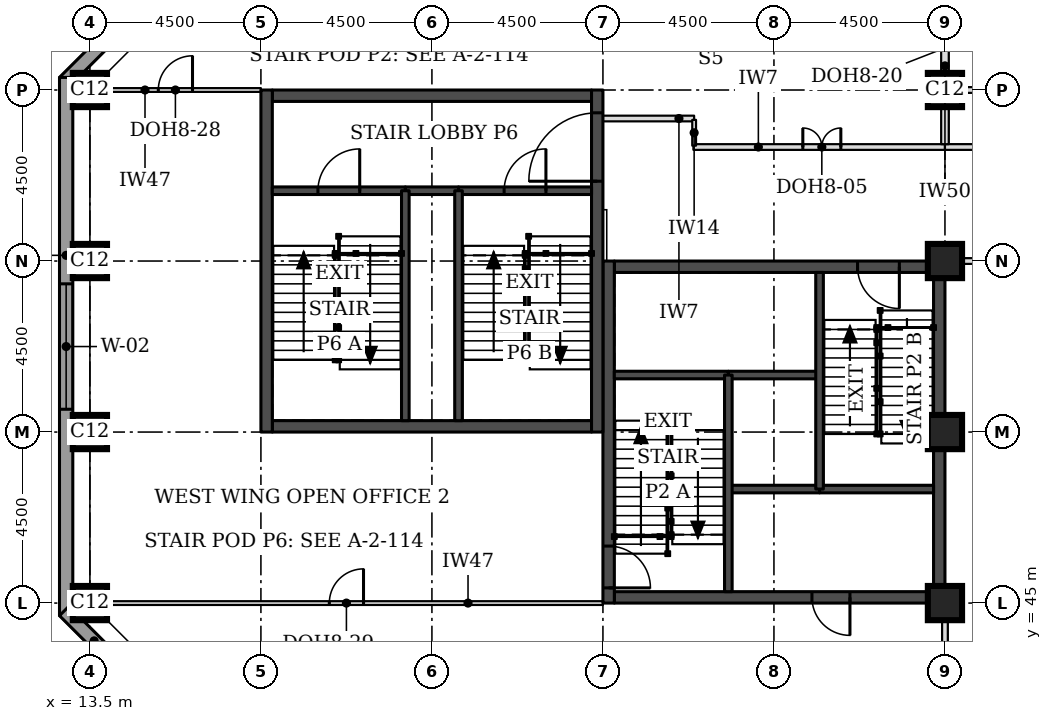
"""IFC4 building model, lengths in metres.
Left out: names, types, materials, properties, quantities, classifications, styles, units other than length and angle.
Written with IfcOpenShell. Run it as: python <this file> out.ifc"""

import sys

from ifc_helpers import new_model, si_unit, direction, frame, frame_2d, origin, origin_2d, place, context, subcontext, project, spatial, rectangle, extrude, element, fill, save


model = new_model("IFC4")
c1 = context("Model", 3, precision=1e-05, world=origin(), true_north=direction((0.0, 1.0)))
c2 = subcontext(c1, "Body", "Model", "MODEL_VIEW")
j1 = project(units=[si_unit("LENGTHUNIT", "METRE"), si_unit("PLANEANGLEUNIT", "RADIAN")], contexts=[c1])
p1 = place(None, origin())
s1 = spatial("IfcSite", under=j1, at=p1, CompositionType="ELEMENT")
p2 = place(p1, origin())
s2 = spatial("IfcBuilding", under=s1, at=p2, CompositionType="ELEMENT")
p3 = place(p2, frame((0.0, 0.0, 199.5)))
s3 = spatial("IfcBuildingStorey", under=s2, at=p3, CompositionType="ELEMENT", Elevation=199.5)
for number, where, z_axis, x_axis in (
    (1, (13.5, 45.0, 0.0), (0.0, 0.0, 1.0), (1.0, 0.0, 0.0)),
    (2, (36.0, 45.0, 0.0), (0.0, 0.0, 1.0), (1.0, 0.0, 0.0)),
    (3, (13.5, 49.5, 0.0), (0.0, 0.0, 1.0), (1.0, 0.0, 0.0)),
    (4, (36.0, 49.5, 0.0), (0.0, 0.0, 1.0), (1.0, 0.0, 0.0)),
    (5, (13.5, 54.0, 0.0), (0.0, 0.0, 1.0), (1.0, 0.0, 0.0)),
    (6, (36.0, 54.0, 0.0), (0.0, 0.0, 1.0), (1.0, 0.0, 0.0)),
    (7, (13.5, 58.5, 0.0), (0.0, 0.0, 1.0), (1.0, 0.0, 0.0)),
    (8, (36.0, 58.5, 0.0), (0.0, 0.0, 1.0), (1.0, 0.0, 0.0)),
):
    element("IfcColumn", number, at=place(p3, frame(where, z_axis=z_axis, x_axis=x_axis)), inside=s3, PredefinedType="COLUMN", context=c2, shape_type="SweptSolid", body=[
        extrude(rectangle(XDim=0.9, YDim=0.9, at=origin_2d()), origin(), (0.0, 0.0, 1.0), 3.7),
    ])
p4 = place(p3, frame((27.3, 45.15, 0.0), z_axis=(0.0, 0.0, 1.0), x_axis=(1.0, 0.0, 0.0)))
e9 = element("IfcWall", 9, at=p4, inside=s3, PredefinedType="SHEAR", context=c2, shape_type="SweptSolid", body=[
    extrude(rectangle(XDim=8.4, YDim=0.3, at=frame_2d((4.2, 0.0))), origin(), (0.0, 0.0, 1.0), 3.7),
])
p5 = place(p4, frame((5.2, 0.0, 0.0)))
e10 = element("IfcOpeningElement", 10, at=p5, cuts=e9, PredefinedType="OPENING", context=c2, shape_type="SweptSolid", body=[
    extrude(rectangle(XDim=1.0, YDim=2.1, at=frame_2d((0.5, 1.05))), frame((0.0, 0.16, 0.0), z_axis=(0.0, -1.0, 0.0), x_axis=(1.0, 0.0, 0.0)), (0.0, 0.0, 1.0), 0.32),
])
p6 = place(p3, frame((27.3, 53.85, 0.0), z_axis=(0.0, 0.0, 1.0), x_axis=(1.0, 0.0, 0.0)))
e11 = element("IfcWall", 11, at=p6, inside=s3, PredefinedType="SHEAR", context=c2, shape_type="SweptSolid", body=[
    extrude(rectangle(XDim=8.4, YDim=0.3, at=frame_2d((4.2, 0.0))), origin(), (0.0, 0.0, 1.0), 3.7),
])
p7 = place(p6, frame((6.4, 0.0, 0.0)))
e12 = element("IfcOpeningElement", 12, at=p7, cuts=e11, PredefinedType="OPENING", context=c2, shape_type="SweptSolid", body=[
    extrude(rectangle(XDim=1.1, YDim=2.1, at=frame_2d((0.55, 1.05))), frame((0.0, 0.16, 0.0), z_axis=(0.0, -1.0, 0.0), x_axis=(1.0, 0.0, 0.0)), (0.0, 0.0, 1.0), 0.32),
])
p8 = place(p3, frame((27.15, 45.0, 0.0), z_axis=(0.0, 0.0, 1.0), x_axis=(0.0, 1.0, 0.0)))
e13 = element("IfcWall", 13, at=p8, inside=s3, PredefinedType="SHEAR", context=c2, shape_type="SweptSolid", body=[
    extrude(rectangle(XDim=9.0, YDim=0.3, at=frame_2d((4.5, 0.0))), origin(), (0.0, 0.0, 1.0), 3.7),
])
p9 = place(p8, frame((0.4, 0.0, 0.0)))
e14 = element("IfcOpeningElement", 14, at=p9, cuts=e13, PredefinedType="OPENING", context=c2, shape_type="SweptSolid", body=[
    extrude(rectangle(XDim=1.1, YDim=2.1, at=frame_2d((0.55, 1.05))), frame((0.0, 0.16, 0.0), z_axis=(0.0, -1.0, 0.0), x_axis=(1.0, 0.0, 0.0)), (0.0, 0.0, 1.0), 0.32),
])
p10 = place(p3, frame((35.85, 45.0, 0.0), z_axis=(0.0, 0.0, 1.0), x_axis=(0.0, 1.0, 0.0)))
e15 = element("IfcWall", 15, at=p10, inside=s3, PredefinedType="SHEAR", context=c2, shape_type="SweptSolid", body=[
    extrude(rectangle(XDim=9.0, YDim=0.3, at=frame_2d((4.5, 0.0))), origin(), (0.0, 0.0, 1.0), 3.7),
])
for number, where, z_axis, x_axis in (
    (16, (18.3, 49.65, 0.0), (0.0, 0.0, 1.0), (1.0, 0.0, 0.0)),
    (17, (18.3, 58.35, 0.0), (0.0, 0.0, 1.0), (1.0, 0.0, 0.0)),
):
    element("IfcWall", number, at=place(p3, frame(where, z_axis=z_axis, x_axis=x_axis)), inside=s3, PredefinedType="SHEAR", context=c2, shape_type="SweptSolid", body=[
        extrude(rectangle(XDim=8.4, YDim=0.3, at=frame_2d((4.2, 0.0))), origin(), (0.0, 0.0, 1.0), 3.7),
    ])
p11 = place(p3, frame((18.15, 49.5, 0.0), z_axis=(0.0, 0.0, 1.0), x_axis=(0.0, 1.0, 0.0)))
e18 = element("IfcWall", 18, at=p11, inside=s3, PredefinedType="SHEAR", context=c2, shape_type="SweptSolid", body=[
    extrude(rectangle(XDim=9.0, YDim=0.3, at=frame_2d((4.5, 0.0))), origin(), (0.0, 0.0, 1.0), 3.7),
])
p12 = place(p3, frame((26.85, 49.5, 0.0), z_axis=(0.0, 0.0, 1.0), x_axis=(0.0, 1.0, 0.0)))
e19 = element("IfcWall", 19, at=p12, inside=s3, PredefinedType="SHEAR", context=c2, shape_type="SweptSolid", body=[
    extrude(rectangle(XDim=9.0, YDim=0.3, at=frame_2d((4.5, 0.0))), origin(), (0.0, 0.0, 1.0), 3.7),
])
p13 = place(p12, frame((6.6, 0.0, 0.0)))
e20 = element("IfcOpeningElement", 20, at=p13, cuts=e19, PredefinedType="OPENING", context=c2, shape_type="SweptSolid", body=[
    extrude(rectangle(XDim=1.8, YDim=2.1, at=frame_2d((0.9, 1.05))), frame((0.0, 0.16, 0.0), z_axis=(0.0, -1.0, 0.0), x_axis=(1.0, 0.0, 0.0)), (0.0, 0.0, 1.0), 0.32),
])
p14 = place(p3, frame((17.792, 63.676, 0.0), z_axis=(0.0, 0.0, 1.0), x_axis=(-0.707106781187, -0.707106781187, 0.0)))
e21 = element("IfcWall", 21, at=p14, inside=s3, PredefinedType="STANDARD", context=c2, shape_type="SweptSolid", body=[
    extrude(rectangle(XDim=7.027, YDim=0.35, at=frame_2d((3.513, 0.0))), origin(), (0.0, 0.0, 1.0), 3.525),
])
p15 = place(p14, frame((1.863, 0.0, 0.9)))
e22 = element("IfcOpeningElement", 22, at=p15, cuts=e21, PredefinedType="OPENING", context=c2, shape_type="SweptSolid", body=[
    extrude(rectangle(XDim=3.3, YDim=1.9, at=frame_2d((1.65, 0.95))), frame((0.0, 0.185, 0.0), z_axis=(0.0, -1.0, 0.0), x_axis=(1.0, 0.0, 0.0)), (0.0, 0.0, 1.0), 0.37),
])
p16 = place(p3, frame((12.875, 58.831, 0.0), z_axis=(0.0, 0.0, 1.0), x_axis=(0.0, -1.0, 0.0)))
e23 = element("IfcWall", 23, at=p16, inside=s3, PredefinedType="STANDARD", context=c2, shape_type="SweptSolid", body=[
    extrude(rectangle(XDim=14.163, YDim=0.35, at=frame_2d((7.081, 0.0))), origin(), (0.0, 0.0, 1.0), 3.525),
])
p17 = place(p16, frame((5.431, 0.0, 0.9)))
e24 = element("IfcOpeningElement", 24, at=p17, cuts=e23, PredefinedType="OPENING", context=c2, shape_type="SweptSolid", body=[
    extrude(rectangle(XDim=3.3, YDim=1.9, at=frame_2d((1.65, 0.95))), frame((0.0, 0.185, 0.0), z_axis=(0.0, -1.0, 0.0), x_axis=(1.0, 0.0, 0.0)), (0.0, 0.0, 1.0), 0.37),
])
p18 = place(p3, frame((12.824, 44.792, 0.0), z_axis=(0.0, 0.0, 1.0), x_axis=(0.707106781187, -0.707106781187, 0.0)))
e25 = element("IfcWall", 25, at=p18, inside=s3, PredefinedType="STANDARD", context=c2, shape_type="SweptSolid", body=[
    extrude(rectangle(XDim=7.027, YDim=0.35, at=frame_2d((3.513, 0.0))), origin(), (0.0, 0.0, 1.0), 3.525),
])
p19 = place(p18, frame((1.863, 0.0, 0.9)))
e26 = element("IfcOpeningElement", 26, at=p19, cuts=e25, PredefinedType="OPENING", context=c2, shape_type="SweptSolid", body=[
    extrude(rectangle(XDim=3.3, YDim=1.9, at=frame_2d((1.65, 0.95))), frame((0.0, 0.185, 0.0), z_axis=(0.0, -1.0, 0.0), x_axis=(1.0, 0.0, 0.0)), (0.0, 0.0, 1.0), 0.37),
])
p20 = place(p3, frame((36.45, 54.0, 0.0), z_axis=(0.0, 0.0, 1.0), x_axis=(1.0, 0.0, 0.0)))
e27 = element("IfcWall", 27, at=p20, inside=s3, PredefinedType="PARTITIONING", context=c2, shape_type="SweptSolid", body=[
    extrude(rectangle(XDim=5.625, YDim=0.15, at=frame_2d((2.812, 0.0))), origin(), (0.0, 0.0, 1.0), 3.55),
])
p21 = place(p3, frame((29.38, 57.0, 0.0), z_axis=(0.0, 0.0, 1.0), x_axis=(1.0, 0.0, 0.0)))
e28 = element("IfcWall", 28, at=p21, inside=s3, PredefinedType="PARTITIONING", context=c2, shape_type="SweptSolid", body=[
    extrude(rectangle(XDim=6.62, YDim=0.15, at=frame_2d((3.31, 0.0))), origin(), (0.0, 0.0, 1.0), 3.55),
])
p22 = place(p21, frame((2.88, 0.0, 0.0)))
e29 = element("IfcOpeningElement", 29, at=p22, cuts=e28, PredefinedType="OPENING", context=c2, shape_type="SweptSolid", body=[
    extrude(rectangle(XDim=1.0, YDim=2.1, at=frame_2d((0.5, 1.05))), frame((0.0, 0.085, 0.0), z_axis=(0.0, -1.0, 0.0), x_axis=(1.0, 0.0, 0.0)), (0.0, 0.0, 1.0), 0.17),
])
p23 = place(p3, frame((36.0, 57.0, 0.0), z_axis=(0.0, 0.0, 1.0), x_axis=(1.0, 0.0, 0.0)))
e30 = element("IfcWall", 30, at=p23, inside=s3, PredefinedType="PARTITIONING", context=c2, shape_type="SweptSolid", body=[
    extrude(rectangle(XDim=6.075, YDim=0.15, at=frame_2d((3.038, 0.0))), origin(), (0.0, 0.0, 1.0), 3.55),
])
p24 = place(p23, frame((2.55, 0.0, 0.0)))
e31 = element("IfcOpeningElement", 31, at=p24, cuts=e30, PredefinedType="OPENING", context=c2, shape_type="SweptSolid", body=[
    extrude(rectangle(XDim=1.0, YDim=2.1, at=frame_2d((0.5, 1.05))), frame((0.0, 0.085, 0.0), z_axis=(0.0, -1.0, 0.0), x_axis=(1.0, 0.0, 0.0)), (0.0, 0.0, 1.0), 0.17),
])
p25 = place(p3, frame((36.45, 58.5, 0.0), z_axis=(0.0, 0.0, 1.0), x_axis=(1.0, 0.0, 0.0)))
e32 = element("IfcWall", 32, at=p25, inside=s3, PredefinedType="PARTITIONING", context=c2, shape_type="SweptSolid", body=[
    extrude(rectangle(XDim=2.625, YDim=0.15, at=frame_2d((1.312, 0.0))), origin(), (0.0, 0.0, 1.0), 3.55),
])
p26 = place(p3, frame((36.0, 40.95, 0.0), z_axis=(0.0, 0.0, 1.0), x_axis=(0.0, 1.0, 0.0)))
e33 = element("IfcWall", 33, at=p26, inside=s3, PredefinedType="PARTITIONING", context=c2, shape_type="SweptSolid", body=[
    extrude(rectangle(XDim=3.63, YDim=0.15, at=frame_2d((1.815, 0.0))), origin(), (0.0, 0.0, 1.0), 2.8),
])
p27 = place(p26, frame((1.4, 0.0, 0.0)))
e34 = element("IfcOpeningElement", 34, at=p27, cuts=e33, PredefinedType="OPENING", context=c2, shape_type="SweptSolid", body=[
    extrude(rectangle(XDim=0.9, YDim=2.1, at=frame_2d((0.45, 1.05))), frame((0.0, 0.085, 0.0), z_axis=(0.0, -1.0, 0.0), x_axis=(1.0, 0.0, 0.0)), (0.0, 0.0, 1.0), 0.17),
])
p28 = place(p3, frame((36.0, 57.075, 0.0), z_axis=(0.0, 0.0, 1.0), x_axis=(0.0, 1.0, 0.0)))
e35 = element("IfcWall", 35, at=p28, inside=s3, PredefinedType="PARTITIONING", context=c2, shape_type="SweptSolid", body=[
    extrude(rectangle(XDim=0.975, YDim=0.2, at=frame_2d((0.488, 0.0))), origin(), (0.0, 0.0, 1.0), 2.8),
])
p29 = place(p3, frame((36.0, 58.92, 0.0), z_axis=(0.0, 0.0, 1.0), x_axis=(0.0, 1.0, 0.0)))
e36 = element("IfcWall", 36, at=p29, inside=s3, PredefinedType="PARTITIONING", context=c2, shape_type="SweptSolid", body=[
    extrude(rectangle(XDim=3.63, YDim=0.2, at=frame_2d((1.815, 0.0))), origin(), (0.0, 0.0, 1.0), 2.8),
])
p30 = place(p3, frame((13.5, 58.5, 0.0), z_axis=(0.0, 0.0, 1.0), x_axis=(1.0, 0.0, 0.0)))
e37 = element("IfcWall", 37, at=p30, inside=s3, PredefinedType="PARTITIONING", context=c2, shape_type="SweptSolid", body=[
    extrude(rectangle(XDim=4.5, YDim=0.1, at=frame_2d((2.25, 0.0))), origin(), (0.0, 0.0, 1.0), 2.55),
])
p31 = place(p30, frame((1.8, 0.0, 0.0)))
e38 = element("IfcOpeningElement", 38, at=p31, cuts=e37, PredefinedType="OPENING", context=c2, shape_type="SweptSolid", body=[
    extrude(rectangle(XDim=0.9, YDim=2.1, at=frame_2d((0.45, 1.05))), frame((0.0, 0.06, 0.0), z_axis=(0.0, -1.0, 0.0), x_axis=(1.0, 0.0, 0.0)), (0.0, 0.0, 1.0), 0.12),
])
p32 = place(p3, frame((27.0, 45.0, 0.0), z_axis=(0.0, 0.0, 1.0), x_axis=(-1.0, 0.0, 0.0)))
e39 = element("IfcWall", 39, at=p32, inside=s3, PredefinedType="PARTITIONING", context=c2, shape_type="SweptSolid", body=[
    extrude(rectangle(XDim=13.5, YDim=0.1, at=frame_2d((6.75, 0.0))), origin(), (0.0, 0.0, 1.0), 2.55),
])
p33 = place(p32, frame((6.3, 0.0, 0.0)))
e40 = element("IfcOpeningElement", 40, at=p33, cuts=e39, PredefinedType="OPENING", context=c2, shape_type="SweptSolid", body=[
    extrude(rectangle(XDim=0.9, YDim=2.1, at=frame_2d((0.45, 1.05))), frame((0.0, 0.06, 0.0), z_axis=(0.0, -1.0, 0.0), x_axis=(1.0, 0.0, 0.0)), (0.0, 0.0, 1.0), 0.12),
])
p34 = place(p3, frame((27.0, 57.75, 0.0), z_axis=(0.0, 0.0, 1.0), x_axis=(1.0, 0.0, 0.0)))
e41 = element("IfcWall", 41, at=p34, inside=s3, PredefinedType="PARTITIONING", context=c2, shape_type="SweptSolid", body=[
    extrude(rectangle(XDim=2.4, YDim=0.15, at=frame_2d((1.2, 0.0))), origin(), (0.0, 0.0, 1.0), 3.55),
])
p35 = place(p3, frame((29.4, 57.715, 0.0), z_axis=(0.0, 0.0, 1.0), x_axis=(0.0, -1.0, 0.0)))
e42 = element("IfcWall", 42, at=p35, inside=s3, PredefinedType="PARTITIONING", context=c2, shape_type="SweptSolid", body=[
    extrude(rectangle(XDim=0.68, YDim=0.1, at=frame_2d((0.34, 0.0))), origin(), (0.0, 0.0, 1.0), 3.55),
])
p36 = place(p3, frame((30.3, 48.0, 0.0), z_axis=(0.0, 0.0, 1.0), x_axis=(1.0, 0.0, 0.0)))
e43 = element("IfcWall", 43, at=p36, inside=s3, PredefinedType="SOLIDWALL", context=c2, shape_type="SweptSolid", body=[
    extrude(rectangle(XDim=2.4, YDim=0.2, at=frame_2d((1.2, 0.0))), origin(), (0.0, 0.0, 1.0), 3.55),
])
p37 = place(p3, frame((32.7, 48.0, 0.0), z_axis=(0.0, 0.0, 1.0), x_axis=(1.0, 0.0, 0.0)))
e44 = element("IfcWall", 44, at=p37, inside=s3, PredefinedType="SOLIDWALL", context=c2, shape_type="SweptSolid", body=[
    extrude(rectangle(XDim=3.0, YDim=0.2, at=frame_2d((1.5, 0.0))), origin(), (0.0, 0.0, 1.0), 3.55),
])
p38 = place(p3, frame((30.3, 51.0, 0.0), z_axis=(0.0, 0.0, 1.0), x_axis=(1.0, 0.0, 0.0)))
e45 = element("IfcWall", 45, at=p38, inside=s3, PredefinedType="SOLIDWALL", context=c2, shape_type="SweptSolid", body=[
    extrude(rectangle(XDim=2.4, YDim=0.2, at=frame_2d((1.2, 0.0))), origin(), (0.0, 0.0, 1.0), 3.7),
])
p39 = place(p3, frame((27.3, 51.0, 0.0), z_axis=(0.0, 0.0, 1.0), x_axis=(1.0, 0.0, 0.0)))
e46 = element("IfcWall", 46, at=p39, inside=s3, PredefinedType="SOLIDWALL", context=c2, shape_type="SweptSolid", body=[
    extrude(rectangle(XDim=3.0, YDim=0.2, at=frame_2d((1.5, 0.0))), origin(), (0.0, 0.0, 1.0), 3.55),
])
for number, where, z_axis, x_axis in (
    (47, (30.3, 45.3, 0.0), (0.0, 0.0, 1.0), (0.0, 1.0, 0.0)),
    (48, (32.7, 48.0, 0.0), (0.0, 0.0, 1.0), (0.0, 1.0, 0.0)),
):
    element("IfcWall", number, at=place(p3, frame(where, z_axis=z_axis, x_axis=x_axis)), inside=s3, PredefinedType="SOLIDWALL", context=c2, shape_type="SweptSolid", body=[
        extrude(rectangle(XDim=5.7, YDim=0.2, at=frame_2d((2.85, 0.0))), origin(), (0.0, 0.0, 1.0), 3.55),
    ])
p40 = place(p3, frame((21.8, 55.85, 0.0), z_axis=(0.0, 0.0, 1.0), x_axis=(1.0, 0.0, 0.0)))
e49 = element("IfcWall", 49, at=p40, inside=s3, PredefinedType="SOLIDWALL", context=c2, shape_type="SweptSolid", body=[
    extrude(rectangle(XDim=1.4, YDim=0.2, at=frame_2d((0.7, 0.0))), origin(), (0.0, 0.0, 1.0), 3.55),
])
p41 = place(p3, frame((18.3, 55.85, 0.0), z_axis=(0.0, 0.0, 1.0), x_axis=(1.0, 0.0, 0.0)))
e50 = element("IfcWall", 50, at=p41, inside=s3, PredefinedType="SOLIDWALL", context=c2, shape_type="SweptSolid", body=[
    extrude(rectangle(XDim=3.5, YDim=0.2, at=frame_2d((1.75, 0.0))), origin(), (0.0, 0.0, 1.0), 3.55),
])
p42 = place(p41, frame((1.2, 0.0, 0.0)))
e51 = element("IfcOpeningElement", 51, at=p42, cuts=e50, PredefinedType="OPENING", context=c2, shape_type="SweptSolid", body=[
    extrude(rectangle(XDim=1.1, YDim=2.1, at=frame_2d((0.55, 1.05))), frame((0.0, 0.11, 0.0), z_axis=(0.0, -1.0, 0.0), x_axis=(1.0, 0.0, 0.0)), (0.0, 0.0, 1.0), 0.22),
])
p43 = place(p3, frame((23.2, 55.85, 0.0), z_axis=(0.0, 0.0, 1.0), x_axis=(1.0, 0.0, 0.0)))
e52 = element("IfcWall", 52, at=p43, inside=s3, PredefinedType="SOLIDWALL", context=c2, shape_type="SweptSolid", body=[
    extrude(rectangle(XDim=3.5, YDim=0.2, at=frame_2d((1.75, 0.0))), origin(), (0.0, 0.0, 1.0), 3.55),
])
p44 = place(p43, frame((1.2, 0.0, 0.0)))
e53 = element("IfcOpeningElement", 53, at=p44, cuts=e52, PredefinedType="OPENING", context=c2, shape_type="SweptSolid", body=[
    extrude(rectangle(XDim=1.1, YDim=2.1, at=frame_2d((0.55, 1.05))), frame((0.0, 0.11, 0.0), z_axis=(0.0, -1.0, 0.0), x_axis=(1.0, 0.0, 0.0)), (0.0, 0.0, 1.0), 0.22),
])
for number, where, z_axis, x_axis in (
    (54, (21.8, 49.8, 0.0), (0.0, 0.0, 1.0), (0.0, 1.0, 0.0)),
    (55, (23.2, 49.8, 0.0), (0.0, 0.0, 1.0), (0.0, 1.0, 0.0)),
):
    element("IfcWall", number, at=place(p3, frame(where, z_axis=z_axis, x_axis=x_axis)), inside=s3, PredefinedType="SOLIDWALL", context=c2, shape_type="SweptSolid", body=[
        extrude(rectangle(XDim=6.05, YDim=0.2, at=frame_2d((3.025, 0.0))), origin(), (0.0, 0.0, 1.0), 3.55),
    ])
p45 = place(p17, origin())
e56 = element("IfcWindow", 56, at=p45, inside=s3, PartitioningType="SINGLE_PANEL", PredefinedType="WINDOW", context=c2, shape_type="SweptSolid", body=[
    extrude(rectangle(XDim=3.3, YDim=1.9, at=frame_2d((1.65, 0.95))), frame((0.0, 0.085, 0.0), z_axis=(0.0, -1.0, 0.0), x_axis=(1.0, 0.0, 0.0)), (0.0, 0.0, 1.0), 0.06),
])
fill(e24, e56)
p46 = place(p22, origin())
e57 = element("IfcDoor", 57, at=p46, inside=s3, OperationType="DOUBLE_DOOR_SINGLE_SWING", PredefinedType="DOOR", context=c2, shape_type="SweptSolid", body=[
    extrude(rectangle(XDim=1.0, YDim=2.1, at=frame_2d((0.5, 1.05))), frame((0.0, 0.025, 0.0), z_axis=(0.0, -1.0, 0.0), x_axis=(1.0, 0.0, 0.0)), (0.0, 0.0, 1.0), 0.05),
])
fill(e29, e57)
p47 = place(p31, origin())
e58 = element("IfcDoor", 58, at=p47, inside=s3, OperationType="SINGLE_SWING_RIGHT", PredefinedType="DOOR", context=c2, shape_type="SweptSolid", body=[
    extrude(rectangle(XDim=0.9, YDim=2.1, at=frame_2d((0.45, 1.05))), frame((0.0, 0.025, 0.0), z_axis=(0.0, -1.0, 0.0), x_axis=(1.0, 0.0, 0.0)), (0.0, 0.0, 1.0), 0.05),
])
fill(e38, e58)
p48 = place(p33, frame((0.9, 0.0, 0.0), z_axis=(0.0, 0.0, 1.0), x_axis=(-1.0, 0.0, 0.0)))
e59 = element("IfcDoor", 59, at=p48, inside=s3, OperationType="SINGLE_SWING_RIGHT", PredefinedType="DOOR", context=c2, shape_type="SweptSolid", body=[
    extrude(rectangle(XDim=0.9, YDim=2.1, at=frame_2d((0.45, 1.05))), frame((0.0, 0.025, 0.0), z_axis=(0.0, -1.0, 0.0), x_axis=(1.0, 0.0, 0.0)), (0.0, 0.0, 1.0), 0.05),
])
fill(e40, e59)
p49 = place(p9, frame((1.1, 0.0, 0.0), z_axis=(0.0, 0.0, 1.0), x_axis=(-1.0, 0.0, 0.0)))
e60 = element("IfcDoor", 60, at=p49, inside=s3, OperationType="SINGLE_SWING_RIGHT", PredefinedType="DOOR", context=c2, shape_type="SweptSolid", body=[
    extrude(rectangle(XDim=1.1, YDim=2.1, at=frame_2d((0.55, 1.05))), frame((0.0, 0.025, 0.0), z_axis=(0.0, -1.0, 0.0), x_axis=(1.0, 0.0, 0.0)), (0.0, 0.0, 1.0), 0.05),
])
fill(e14, e60)
p50 = place(p7, frame((1.1, 0.0, 0.0), z_axis=(0.0, 0.0, 1.0), x_axis=(-1.0, 0.0, 0.0)))
e61 = element("IfcDoor", 61, at=p50, inside=s3, OperationType="SINGLE_SWING_LEFT", PredefinedType="DOOR", context=c2, shape_type="SweptSolid", body=[
    extrude(rectangle(XDim=1.1, YDim=2.1, at=frame_2d((0.55, 1.05))), frame((0.0, 0.025, 0.0), z_axis=(0.0, -1.0, 0.0), x_axis=(1.0, 0.0, 0.0)), (0.0, 0.0, 1.0), 0.05),
])
fill(e12, e61)
p51 = place(p5, frame((1.0, 0.0, 0.0), z_axis=(0.0, 0.0, 1.0), x_axis=(-1.0, 0.0, 0.0)))
e62 = element("IfcDoor", 62, at=p51, inside=s3, OperationType="SINGLE_SWING_LEFT", PredefinedType="DOOR", context=c2, shape_type="SweptSolid", body=[
    extrude(rectangle(XDim=1.0, YDim=2.1, at=frame_2d((0.5, 1.05))), frame((0.0, 0.025, 0.0), z_axis=(0.0, -1.0, 0.0), x_axis=(1.0, 0.0, 0.0)), (0.0, 0.0, 1.0), 0.05),
])
fill(e10, e62)
p52 = place(p42, origin())
e63 = element("IfcDoor", 63, at=p52, inside=s3, OperationType="SINGLE_SWING_RIGHT", PredefinedType="DOOR", context=c2, shape_type="SweptSolid", body=[
    extrude(rectangle(XDim=1.1, YDim=2.1, at=frame_2d((0.55, 1.05))), frame((0.0, 0.025, 0.0), z_axis=(0.0, -1.0, 0.0), x_axis=(1.0, 0.0, 0.0)), (0.0, 0.0, 1.0), 0.05),
])
fill(e51, e63)
p53 = place(p44, origin())
e64 = element("IfcDoor", 64, at=p53, inside=s3, OperationType="SINGLE_SWING_RIGHT", PredefinedType="DOOR", context=c2, shape_type="SweptSolid", body=[
    extrude(rectangle(XDim=1.1, YDim=2.1, at=frame_2d((0.55, 1.05))), frame((0.0, 0.025, 0.0), z_axis=(0.0, -1.0, 0.0), x_axis=(1.0, 0.0, 0.0)), (0.0, 0.0, 1.0), 0.05),
])
fill(e53, e64)
p54 = place(p13, origin())
e65 = element("IfcDoor", 65, at=p54, inside=s3, OperationType="SINGLE_SWING_LEFT", PredefinedType="DOOR", context=c2, shape_type="SweptSolid", body=[
    extrude(rectangle(XDim=1.8, YDim=2.1, at=frame_2d((0.9, 1.05))), frame((0.0, 0.025, 0.0), z_axis=(0.0, -1.0, 0.0), x_axis=(1.0, 0.0, 0.0)), (0.0, 0.0, 1.0), 0.05),
])
fill(e20, e65)
save(model, sys.argv[1])
